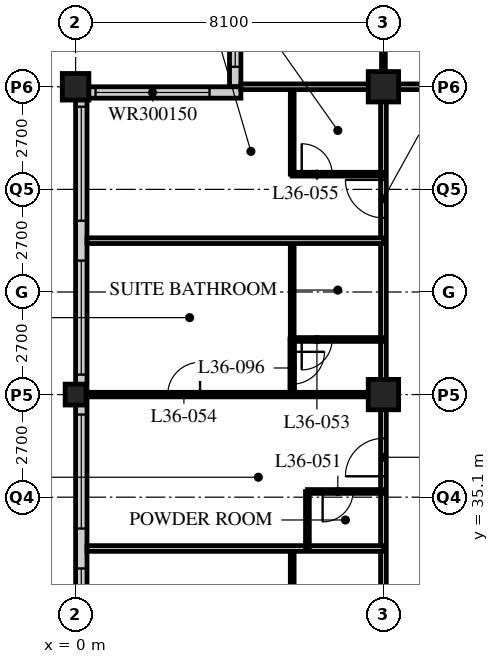
"""IFC4 building model, lengths in metres.
Left out: names, types, materials, properties, quantities, classifications, styles, units other than length and angle.
Written with IfcOpenShell. Run it as: python <this file> out.ifc"""

import sys

from ifc_helpers import new_model, si_unit, direction, frame, frame_2d, origin, origin_2d, place, context, subcontext, project, spatial, rectangle, hollow_rectangle, extrude, element, fill, save


model = new_model("IFC4")
c1 = context("Model", 3, precision=1e-05, world=origin(), true_north=direction((0.0, 1.0)))
c2 = subcontext(c1, "Body", "Model", "MODEL_VIEW")
j1 = project(units=[si_unit("LENGTHUNIT", "METRE"), si_unit("PLANEANGLEUNIT", "RADIAN")], contexts=[c1])
p1 = place(None, origin())
s1 = spatial("IfcSite", under=j1, at=p1, CompositionType="ELEMENT")
p2 = place(p1, origin())
s2 = spatial("IfcBuilding", under=s1, at=p2, CompositionType="ELEMENT")
p3 = place(p2, frame((0.0, 0.0, 140.8)))
s3 = spatial("IfcBuildingStorey", under=s2, at=p3, CompositionType="ELEMENT", Elevation=140.8)
p4 = place(p3, frame((0.0, 37.8, 0.0), z_axis=(0.0, 0.0, 1.0), x_axis=(1.0, 0.0, 0.0)))
e1 = element("IfcColumn", 1, at=p4, inside=s3, PredefinedType="COLUMN", context=c2, shape_type="SweptSolid", body=[
    extrude(hollow_rectangle(XDim=0.55, YDim=0.55, WallThickness=0.04, at=origin_2d()), origin(), (0.0, 0.0, 1.0), 3.4),
])
p5 = place(p3, frame((0.0, 45.9, 0.0), z_axis=(0.0, 0.0, 1.0), x_axis=(1.0, 0.0, 0.0)))
e2 = element("IfcColumn", 2, at=p5, inside=s3, PredefinedType="COLUMN", context=c2, shape_type="SweptSolid", body=[
    extrude(hollow_rectangle(XDim=0.7, YDim=0.7, WallThickness=0.07, at=origin_2d()), origin(), (0.0, 0.0, 1.0), 3.4),
])
for number, where, z_axis, x_axis in (
    (3, (8.1, 37.8, 0.0), (0.0, 0.0, 1.0), (1.0, 0.0, 0.0)),
    (4, (8.1, 45.9, 0.0), (0.0, 0.0, 1.0), (1.0, 0.0, 0.0)),
):
    element("IfcColumn", number, at=place(p3, frame(where, z_axis=z_axis, x_axis=x_axis)), inside=s3, PredefinedType="COLUMN", context=c2, shape_type="SweptSolid", body=[
        extrude(hollow_rectangle(XDim=0.8, YDim=0.8, WallThickness=0.08, at=origin_2d()), origin(), (0.0, 0.0, 1.0), 3.4),
    ])
p6 = place(p3, frame((4.2, 49.65, 0.0), z_axis=(0.0, 0.0, 1.0), x_axis=(0.0, -1.0, 0.0)))
e5 = element("IfcWall", 5, at=p6, inside=s3, PredefinedType="SOLIDWALL", context=c2, shape_type="SweptSolid", body=[
    extrude(rectangle(XDim=3.75, YDim=0.3, at=frame_2d((1.875, 0.0))), origin(), (0.0, 0.0, 1.0), 3.19),
])
p7 = place(p6, frame((0.225, 0.0, 0.9)))
e6 = element("IfcOpeningElement", 6, at=p7, cuts=e5, PredefinedType="OPENING", context=c2, shape_type="SweptSolid", body=[
    extrude(rectangle(XDim=3.0, YDim=1.5, at=frame_2d((1.5, 0.75))), frame((0.0, 0.16, 0.0), z_axis=(0.0, -1.0, 0.0), x_axis=(1.0, 0.0, 0.0)), (0.0, 0.0, 1.0), 0.32),
])
p8 = place(p3, frame((4.35, 45.75, 0.0), z_axis=(0.0, 0.0, 1.0), x_axis=(-1.0, 0.0, 0.0)))
e7 = element("IfcWall", 7, at=p8, inside=s3, PredefinedType="SOLIDWALL", context=c2, shape_type="SweptSolid", body=[
    extrude(rectangle(XDim=4.35, YDim=0.3, at=frame_2d((2.175, 0.0))), origin(), (0.0, 0.0, 1.0), 3.19),
])
p9 = place(p8, frame((0.825, 0.0, 0.9)))
e8 = element("IfcOpeningElement", 8, at=p9, cuts=e7, PredefinedType="OPENING", context=c2, shape_type="SweptSolid", body=[
    extrude(rectangle(XDim=3.0, YDim=1.5, at=frame_2d((1.5, 0.75))), frame((0.0, 0.16, 0.0), z_axis=(0.0, -1.0, 0.0), x_axis=(1.0, 0.0, 0.0)), (0.0, 0.0, 1.0), 0.32),
])
p10 = place(p3, frame((0.15, 45.6, 0.0), z_axis=(0.0, 0.0, 1.0), x_axis=(0.0, -1.0, 0.0)))
e9 = element("IfcWall", 9, at=p10, inside=s3, PredefinedType="SOLIDWALL", context=c2, shape_type="SweptSolid", body=[
    extrude(rectangle(XDim=32.1, YDim=0.3, at=frame_2d((16.05, 0.0))), origin(), (0.0, 0.0, 1.0), 3.19),
])
p11 = place(p10, frame((0.225, 0.0, 0.9)))
e10 = element("IfcOpeningElement", 10, at=p11, cuts=e9, PredefinedType="OPENING", context=c2, shape_type="SweptSolid", body=[
    extrude(rectangle(XDim=3.0, YDim=2.0, at=frame_2d((1.5, 1.0))), frame((0.0, 0.16, 0.0), z_axis=(0.0, -1.0, 0.0), x_axis=(1.0, 0.0, 0.0)), (0.0, 0.0, 1.0), 0.32),
])
p12 = place(p10, frame((4.275, 0.0, 0.9)))
e11 = element("IfcOpeningElement", 11, at=p12, cuts=e9, PredefinedType="OPENING", context=c2, shape_type="SweptSolid", body=[
    extrude(rectangle(XDim=3.0, YDim=2.0, at=frame_2d((1.5, 1.0))), frame((0.0, 0.16, 0.0), z_axis=(0.0, -1.0, 0.0), x_axis=(1.0, 0.0, 0.0)), (0.0, 0.0, 1.0), 0.32),
])
p13 = place(p10, frame((8.325, 0.0, 0.9)))
e12 = element("IfcOpeningElement", 12, at=p13, cuts=e9, PredefinedType="OPENING", context=c2, shape_type="SweptSolid", body=[
    extrude(rectangle(XDim=3.0, YDim=2.0, at=frame_2d((1.5, 1.0))), frame((0.0, 0.16, 0.0), z_axis=(0.0, -1.0, 0.0), x_axis=(1.0, 0.0, 0.0)), (0.0, 0.0, 1.0), 0.32),
])
p14 = place(p10, frame((12.375, 0.0, 0.9)))
e13 = element("IfcOpeningElement", 13, at=p14, cuts=e9, PredefinedType="OPENING", context=c2, shape_type="SweptSolid", body=[
    extrude(rectangle(XDim=3.0, YDim=2.0, at=frame_2d((1.5, 1.0))), frame((0.0, 0.16, 0.0), z_axis=(0.0, -1.0, 0.0), x_axis=(1.0, 0.0, 0.0)), (0.0, 0.0, 1.0), 0.32),
])
p15 = place(p10, frame((16.425, 0.0, 0.9)))
e14 = element("IfcOpeningElement", 14, at=p15, cuts=e9, PredefinedType="OPENING", context=c2, shape_type="SweptSolid", body=[
    extrude(rectangle(XDim=3.0, YDim=2.0, at=frame_2d((1.5, 1.0))), frame((0.0, 0.16, 0.0), z_axis=(0.0, -1.0, 0.0), x_axis=(1.0, 0.0, 0.0)), (0.0, 0.0, 1.0), 0.32),
])
p16 = place(p10, frame((20.475, 0.0, 0.9)))
e15 = element("IfcOpeningElement", 15, at=p16, cuts=e9, PredefinedType="OPENING", context=c2, shape_type="SweptSolid", body=[
    extrude(rectangle(XDim=3.0, YDim=2.0, at=frame_2d((1.5, 1.0))), frame((0.0, 0.16, 0.0), z_axis=(0.0, -1.0, 0.0), x_axis=(1.0, 0.0, 0.0)), (0.0, 0.0, 1.0), 0.32),
])
p17 = place(p10, frame((24.525, 0.0, 0.9)))
e16 = element("IfcOpeningElement", 16, at=p17, cuts=e9, PredefinedType="OPENING", context=c2, shape_type="SweptSolid", body=[
    extrude(rectangle(XDim=3.0, YDim=2.0, at=frame_2d((1.5, 1.0))), frame((0.0, 0.16, 0.0), z_axis=(0.0, -1.0, 0.0), x_axis=(1.0, 0.0, 0.0)), (0.0, 0.0, 1.0), 0.32),
])
p18 = place(p10, frame((28.575, 0.0, 0.9)))
e17 = element("IfcOpeningElement", 17, at=p18, cuts=e9, PredefinedType="OPENING", context=c2, shape_type="SweptSolid", body=[
    extrude(rectangle(XDim=3.0, YDim=2.0, at=frame_2d((1.5, 1.0))), frame((0.0, 0.16, 0.0), z_axis=(0.0, -1.0, 0.0), x_axis=(1.0, 0.0, 0.0)), (0.0, 0.0, 1.0), 0.32),
])
p19 = place(p3, frame((8.1, 45.9, 0.0), z_axis=(0.0, 0.0, 1.0), x_axis=(1.0, 0.0, 0.0)))
e18 = element("IfcWall", 18, at=p19, inside=s3, PredefinedType="PARTITIONING", context=c2, shape_type="SweptSolid", body=[
    extrude(rectangle(XDim=36.45, YDim=0.15, at=frame_2d((18.225, 0.0))), origin(), (0.0, 0.0, 1.0), 2.578),
])
p20 = place(p19, frame((9.625, 0.0, 0.0)))
e19 = element("IfcOpeningElement", 19, at=p20, cuts=e18, PredefinedType="OPENING", context=c2, shape_type="SweptSolid", body=[
    extrude(rectangle(XDim=1.0, YDim=2.1, at=frame_2d((0.5, 1.05))), frame((0.0, 0.085, 0.0), z_axis=(0.0, -1.0, 0.0), x_axis=(1.0, 0.0, 0.0)), (0.0, 0.0, 1.0), 0.17),
])
p21 = place(p19, frame((21.775, 0.0, 0.0)))
e20 = element("IfcOpeningElement", 20, at=p21, cuts=e18, PredefinedType="OPENING", context=c2, shape_type="SweptSolid", body=[
    extrude(rectangle(XDim=1.0, YDim=2.1, at=frame_2d((0.5, 1.05))), frame((0.0, 0.085, 0.0), z_axis=(0.0, -1.0, 0.0), x_axis=(1.0, 0.0, 0.0)), (0.0, 0.0, 1.0), 0.17),
])
p22 = place(p19, frame((28.95, 0.0, 0.0)))
e21 = element("IfcOpeningElement", 21, at=p22, cuts=e18, PredefinedType="OPENING", context=c2, shape_type="SweptSolid", body=[
    extrude(rectangle(XDim=1.0, YDim=2.1, at=frame_2d((0.5, 1.05))), frame((0.0, 0.085, 0.0), z_axis=(0.0, -1.0, 0.0), x_axis=(1.0, 0.0, 0.0)), (0.0, 0.0, 1.0), 0.17),
])
p23 = place(p19, frame((33.925, 0.0, 0.0)))
e22 = element("IfcOpeningElement", 22, at=p23, cuts=e18, PredefinedType="OPENING", context=c2, shape_type="SweptSolid", body=[
    extrude(rectangle(XDim=1.0, YDim=2.1, at=frame_2d((0.5, 1.05))), frame((0.0, 0.085, 0.0), z_axis=(0.0, -1.0, 0.0), x_axis=(1.0, 0.0, 0.0)), (0.0, 0.0, 1.0), 0.17),
])
p24 = place(p19, frame((2.625, 0.0, 0.0)))
e23 = element("IfcOpeningElement", 23, at=p24, cuts=e18, PredefinedType="OPENING", context=c2, shape_type="SweptSolid", body=[
    extrude(rectangle(XDim=1.0, YDim=2.1, at=frame_2d((0.5, 1.05))), frame((0.0, 0.085, 0.0), z_axis=(0.0, -1.0, 0.0), x_axis=(1.0, 0.0, 0.0)), (0.0, 0.0, 1.0), 0.17),
])
p25 = place(p3, frame((8.1, 17.55, 0.0), z_axis=(0.0, 0.0, 1.0), x_axis=(0.0, 1.0, 0.0)))
e24 = element("IfcWall", 24, at=p25, inside=s3, PredefinedType="PARTITIONING", context=c2, shape_type="SweptSolid", body=[
    extrude(rectangle(XDim=28.35, YDim=0.15, at=frame_2d((14.175, 0.0))), origin(), (0.0, 0.0, 1.0), 2.578),
])
p26 = place(p25, frame((1.9, 0.0, 0.0)))
e25 = element("IfcOpeningElement", 25, at=p26, cuts=e24, PredefinedType="OPENING", context=c2, shape_type="SweptSolid", body=[
    extrude(rectangle(XDim=1.0, YDim=2.1, at=frame_2d((0.5, 1.05))), frame((0.0, 0.085, 0.0), z_axis=(0.0, -1.0, 0.0), x_axis=(1.0, 0.0, 0.0)), (0.0, 0.0, 1.0), 0.17),
])
p27 = place(p25, frame((10.0, 0.0, 0.0)))
e26 = element("IfcOpeningElement", 26, at=p27, cuts=e24, PredefinedType="OPENING", context=c2, shape_type="SweptSolid", body=[
    extrude(rectangle(XDim=1.0, YDim=2.1, at=frame_2d((0.5, 1.05))), frame((0.0, 0.085, 0.0), z_axis=(0.0, -1.0, 0.0), x_axis=(1.0, 0.0, 0.0)), (0.0, 0.0, 1.0), 0.17),
])
p28 = place(p25, frame((18.1, 0.0, 0.0)))
e27 = element("IfcOpeningElement", 27, at=p28, cuts=e24, PredefinedType="OPENING", context=c2, shape_type="SweptSolid", body=[
    extrude(rectangle(XDim=1.0, YDim=2.1, at=frame_2d((0.5, 1.05))), frame((0.0, 0.085, 0.0), z_axis=(0.0, -1.0, 0.0), x_axis=(1.0, 0.0, 0.0)), (0.0, 0.0, 1.0), 0.17),
])
p29 = place(p25, frame((24.9, 0.0, 0.0)))
e28 = element("IfcOpeningElement", 28, at=p29, cuts=e24, PredefinedType="OPENING", context=c2, shape_type="SweptSolid", body=[
    extrude(rectangle(XDim=1.0, YDim=2.1, at=frame_2d((0.5, 1.05))), frame((0.0, 0.085, 0.0), z_axis=(0.0, -1.0, 0.0), x_axis=(1.0, 0.0, 0.0)), (0.0, 0.0, 1.0), 0.17),
])
p30 = place(p3, frame((5.7, 31.15, 0.0), z_axis=(0.0, 0.0, 1.0), x_axis=(0.0, 1.0, 0.0)))
e29 = element("IfcWall", 29, at=p30, inside=s3, PredefinedType="PARTITIONING", context=c2, shape_type="SweptSolid", body=[
    extrude(rectangle(XDim=2.6, YDim=0.1, at=frame_2d((1.3, 0.0))), origin(), (0.0, 0.0, 1.0), 3.19),
])
p31 = place(p3, frame((8.1, 33.75, 0.0), z_axis=(0.0, 0.0, 1.0), x_axis=(-1.0, 0.0, 0.0)))
e30 = element("IfcWall", 30, at=p31, inside=s3, PredefinedType="PARTITIONING", context=c2, shape_type="SweptSolid", body=[
    extrude(rectangle(XDim=7.8, YDim=0.15, at=frame_2d((3.9, 0.0))), origin(), (0.0, 0.0, 1.0), 3.19),
])
p32 = place(p3, frame((6.1, 33.75, 0.0), z_axis=(0.0, 0.0, 1.0), x_axis=(0.0, 1.0, 0.0)))
e31 = element("IfcWall", 31, at=p32, inside=s3, PredefinedType="PARTITIONING", context=c2, shape_type="SweptSolid", body=[
    extrude(rectangle(XDim=1.5, YDim=0.1, at=frame_2d((0.75, 0.0))), origin(), (0.0, 0.0, 1.0), 3.19),
])
p33 = place(p3, frame((8.1, 35.25, 0.0), z_axis=(0.0, 0.0, 1.0), x_axis=(-1.0, 0.0, 0.0)))
e32 = element("IfcWall", 32, at=p33, inside=s3, PredefinedType="PARTITIONING", context=c2, shape_type="SweptSolid", body=[
    extrude(rectangle(XDim=2.0, YDim=0.1, at=frame_2d((1.0, 0.0))), origin(), (0.0, 0.0, 1.0), 3.19),
])
p34 = place(p33, frame((0.8, 0.0, 0.0)))
e33 = element("IfcOpeningElement", 33, at=p34, cuts=e32, PredefinedType="OPENING", context=c2, shape_type="SweptSolid", body=[
    extrude(rectangle(XDim=0.8, YDim=2.1, at=frame_2d((0.4, 1.05))), frame((0.0, 0.06, 0.0), z_axis=(0.0, -1.0, 0.0), x_axis=(1.0, 0.0, 0.0)), (0.0, 0.0, 1.0), 0.12),
])
p35 = place(p3, frame((5.7, 39.25, 0.0), z_axis=(0.0, 0.0, 1.0), x_axis=(0.0, 1.0, 0.0)))
e34 = element("IfcWall", 34, at=p35, inside=s3, PredefinedType="PARTITIONING", context=c2, shape_type="SweptSolid", body=[
    extrude(rectangle(XDim=2.6, YDim=0.1, at=frame_2d((1.3, 0.0))), origin(), (0.0, 0.0, 1.0), 3.19),
])
p36 = place(p3, frame((8.1, 39.25, 0.0), z_axis=(0.0, 0.0, 1.0), x_axis=(-1.0, 0.0, 0.0)))
e35 = element("IfcWall", 35, at=p36, inside=s3, PredefinedType="PARTITIONING", context=c2, shape_type="SweptSolid", body=[
    extrude(rectangle(XDim=2.4, YDim=0.1, at=frame_2d((1.2, 0.0))), origin(), (0.0, 0.0, 1.0), 3.19),
])
p37 = place(p36, frame((1.35, 0.0, 0.0)))
e36 = element("IfcOpeningElement", 36, at=p37, cuts=e35, PredefinedType="OPENING", context=c2, shape_type="SweptSolid", body=[
    extrude(rectangle(XDim=0.8, YDim=2.1, at=frame_2d((0.4, 1.05))), frame((0.0, 0.06, 0.0), z_axis=(0.0, -1.0, 0.0), x_axis=(1.0, 0.0, 0.0)), (0.0, 0.0, 1.0), 0.12),
])
p38 = place(p3, frame((8.1, 37.8, 0.0), z_axis=(0.0, 0.0, 1.0), x_axis=(-1.0, 0.0, 0.0)))
e37 = element("IfcWall", 37, at=p38, inside=s3, PredefinedType="PARTITIONING", context=c2, shape_type="SweptSolid", body=[
    extrude(rectangle(XDim=7.8, YDim=0.12, at=frame_2d((3.9, 0.0))), origin(), (0.0, 0.0, 1.0), 2.578),
])
p39 = place(p38, frame((4.825, 0.0, 0.0)))
e38 = element("IfcOpeningElement", 38, at=p39, cuts=e37, PredefinedType="OPENING", context=c2, shape_type="SweptSolid", body=[
    extrude(rectangle(XDim=0.85, YDim=2.1, at=frame_2d((0.425, 1.05))), frame((0.0, 0.07, 0.0), z_axis=(0.0, -1.0, 0.0), x_axis=(1.0, 0.0, 0.0)), (0.0, 0.0, 1.0), 0.14),
])
p40 = place(p3, frame((8.1, 41.85, 0.0), z_axis=(0.0, 0.0, 1.0), x_axis=(-1.0, 0.0, 0.0)))
e39 = element("IfcWall", 39, at=p40, inside=s3, PredefinedType="PARTITIONING", context=c2, shape_type="SweptSolid", body=[
    extrude(rectangle(XDim=7.8, YDim=0.15, at=frame_2d((3.9, 0.0))), origin(), (0.0, 0.0, 1.0), 3.19),
])
p41 = place(p3, frame((5.7, 43.6, 0.0), z_axis=(0.0, 0.0, 1.0), x_axis=(0.0, 1.0, 0.0)))
e40 = element("IfcWall", 40, at=p41, inside=s3, PredefinedType="PARTITIONING", context=c2, shape_type="SweptSolid", body=[
    extrude(rectangle(XDim=2.3, YDim=0.1, at=frame_2d((1.15, 0.0))), origin(), (0.0, 0.0, 1.0), 3.19),
])
p42 = place(p3, frame((8.1, 43.6, 0.0), z_axis=(0.0, 0.0, 1.0), x_axis=(-1.0, 0.0, 0.0)))
e41 = element("IfcWall", 41, at=p42, inside=s3, PredefinedType="PARTITIONING", context=c2, shape_type="SweptSolid", body=[
    extrude(rectangle(XDim=2.4, YDim=0.1, at=frame_2d((1.2, 0.0))), origin(), (0.0, 0.0, 1.0), 3.19),
])
p43 = place(p42, frame((1.35, 0.0, 0.0)))
e42 = element("IfcOpeningElement", 42, at=p43, cuts=e41, PredefinedType="OPENING", context=c2, shape_type="SweptSolid", body=[
    extrude(rectangle(XDim=0.8, YDim=2.1, at=frame_2d((0.4, 1.05))), frame((0.0, 0.06, 0.0), z_axis=(0.0, -1.0, 0.0), x_axis=(1.0, 0.0, 0.0)), (0.0, 0.0, 1.0), 0.12),
])
p44 = place(p3, frame((8.1, 45.9, 0.0), z_axis=(0.0, 0.0, 1.0), x_axis=(0.0, 1.0, 0.0)))
e43 = element("IfcWall", 43, at=p44, inside=s3, PredefinedType="PARTITIONING", context=c2, shape_type="SweptSolid", body=[
    extrude(rectangle(XDim=2.4, YDim=0.1, at=frame_2d((1.2, 0.0))), origin(), (0.0, 0.0, 1.0), 2.578),
])
p45 = place(p3, frame((4.35, 45.9, 0.0), z_axis=(0.0, 0.0, 1.0), x_axis=(1.0, 0.0, 0.0)))
e44 = element("IfcWall", 44, at=p45, inside=s3, PredefinedType="PARTITIONING", context=c2, shape_type="SweptSolid", body=[
    extrude(rectangle(XDim=3.75, YDim=0.15, at=frame_2d((1.875, 0.0))), origin(), (0.0, 0.0, 1.0), 2.578),
])
p46 = place(p3, frame((5.7, 37.8, 0.0), z_axis=(0.0, 0.0, 1.0), x_axis=(0.0, 1.0, 0.0)))
e45 = element("IfcWall", 45, at=p46, inside=s3, PredefinedType="PARTITIONING", context=c2, shape_type="SweptSolid", body=[
    extrude(rectangle(XDim=1.46, YDim=0.12, at=frame_2d((0.73, 0.0))), origin(), (0.0, 0.0, 1.0), 3.19),
])
p47 = place(p46, frame((0.275, 0.0, 0.0)))
e46 = element("IfcOpeningElement", 46, at=p47, cuts=e45, PredefinedType="OPENING", context=c2, shape_type="SweptSolid", body=[
    extrude(rectangle(XDim=0.85, YDim=2.1, at=frame_2d((0.425, 1.05))), frame((0.0, 0.07, 0.0), z_axis=(0.0, -1.0, 0.0), x_axis=(1.0, 0.0, 0.0)), (0.0, 0.0, 1.0), 0.14),
])
p48 = place(p7, origin())
e47 = element("IfcWindow", 47, at=p48, inside=s3, PartitioningType="SINGLE_PANEL", PredefinedType="WINDOW", context=c2, shape_type="SweptSolid", body=[
    extrude(rectangle(XDim=3.0, YDim=1.5, at=frame_2d((1.5, 0.75))), frame((0.0, 0.03, 0.0), z_axis=(0.0, -1.0, 0.0), x_axis=(1.0, 0.0, 0.0)), (0.0, 0.0, 1.0), 0.06),
])
fill(e6, e47)
p49 = place(p9, origin())
e48 = element("IfcWindow", 48, at=p49, inside=s3, PartitioningType="SINGLE_PANEL", PredefinedType="WINDOW", context=c2, shape_type="SweptSolid", body=[
    extrude(rectangle(XDim=3.0, YDim=1.5, at=frame_2d((1.5, 0.75))), frame((0.0, 0.03, 0.0), z_axis=(0.0, -1.0, 0.0), x_axis=(1.0, 0.0, 0.0)), (0.0, 0.0, 1.0), 0.06),
])
fill(e8, e48)
p50 = place(p11, origin())
e49 = element("IfcWindow", 49, at=p50, inside=s3, PartitioningType="SINGLE_PANEL", PredefinedType="WINDOW", context=c2, shape_type="SweptSolid", body=[
    extrude(rectangle(XDim=3.0, YDim=2.0, at=frame_2d((1.5, 1.0))), frame((0.0, 0.03, 0.0), z_axis=(0.0, -1.0, 0.0), x_axis=(1.0, 0.0, 0.0)), (0.0, 0.0, 1.0), 0.06),
])
fill(e10, e49)
p51 = place(p12, origin())
e50 = element("IfcWindow", 50, at=p51, inside=s3, PartitioningType="SINGLE_PANEL", PredefinedType="WINDOW", context=c2, shape_type="SweptSolid", body=[
    extrude(rectangle(XDim=3.0, YDim=2.0, at=frame_2d((1.5, 1.0))), frame((0.0, 0.03, 0.0), z_axis=(0.0, -1.0, 0.0), x_axis=(1.0, 0.0, 0.0)), (0.0, 0.0, 1.0), 0.06),
])
fill(e11, e50)
p52 = place(p13, origin())
e51 = element("IfcWindow", 51, at=p52, inside=s3, PartitioningType="SINGLE_PANEL", PredefinedType="WINDOW", context=c2, shape_type="SweptSolid", body=[
    extrude(rectangle(XDim=3.0, YDim=2.0, at=frame_2d((1.5, 1.0))), frame((0.0, 0.03, 0.0), z_axis=(0.0, -1.0, 0.0), x_axis=(1.0, 0.0, 0.0)), (0.0, 0.0, 1.0), 0.06),
])
fill(e12, e51)
p53 = place(p14, origin())
e52 = element("IfcWindow", 52, at=p53, inside=s3, PartitioningType="SINGLE_PANEL", PredefinedType="WINDOW", context=c2, shape_type="SweptSolid", body=[
    extrude(rectangle(XDim=3.0, YDim=2.0, at=frame_2d((1.5, 1.0))), frame((0.0, 0.03, 0.0), z_axis=(0.0, -1.0, 0.0), x_axis=(1.0, 0.0, 0.0)), (0.0, 0.0, 1.0), 0.06),
])
fill(e13, e52)
p54 = place(p34, origin())
e53 = element("IfcDoor", 53, at=p54, inside=s3, OperationType="SINGLE_SWING_RIGHT", PredefinedType="DOOR", context=c2, shape_type="SweptSolid", body=[
    extrude(rectangle(XDim=0.8, YDim=2.1, at=frame_2d((0.4, 1.05))), frame((0.0, 0.025, 0.0), z_axis=(0.0, -1.0, 0.0), x_axis=(1.0, 0.0, 0.0)), (0.0, 0.0, 1.0), 0.05),
])
fill(e33, e53)
p55 = place(p28, origin())
e54 = element("IfcDoor", 54, at=p55, inside=s3, OperationType="SINGLE_SWING_LEFT", PredefinedType="DOOR", context=c2, shape_type="SweptSolid", body=[
    extrude(rectangle(XDim=1.0, YDim=2.1, at=frame_2d((0.5, 1.05))), frame((0.0, 0.025, 0.0), z_axis=(0.0, -1.0, 0.0), x_axis=(1.0, 0.0, 0.0)), (0.0, 0.0, 1.0), 0.05),
])
fill(e27, e54)
p56 = place(p37, origin())
e55 = element("IfcDoor", 55, at=p56, inside=s3, OperationType="SINGLE_SWING_RIGHT", PredefinedType="DOOR", context=c2, shape_type="SweptSolid", body=[
    extrude(rectangle(XDim=0.8, YDim=2.1, at=frame_2d((0.4, 1.05))), frame((0.0, 0.025, 0.0), z_axis=(0.0, -1.0, 0.0), x_axis=(1.0, 0.0, 0.0)), (0.0, 0.0, 1.0), 0.05),
])
fill(e36, e55)
p57 = place(p39, origin())
e56 = element("IfcDoor", 56, at=p57, inside=s3, OperationType="SINGLE_SWING_RIGHT", PredefinedType="DOOR", context=c2, shape_type="SweptSolid", body=[
    extrude(rectangle(XDim=0.85, YDim=2.1, at=frame_2d((0.425, 1.05))), frame((0.0, 0.025, 0.0), z_axis=(0.0, -1.0, 0.0), x_axis=(1.0, 0.0, 0.0)), (0.0, 0.0, 1.0), 0.05),
])
fill(e38, e56)
p58 = place(p43, origin())
e57 = element("IfcDoor", 57, at=p58, inside=s3, OperationType="SINGLE_SWING_LEFT", PredefinedType="DOOR", context=c2, shape_type="SweptSolid", body=[
    extrude(rectangle(XDim=0.8, YDim=2.1, at=frame_2d((0.4, 1.05))), frame((0.0, 0.025, 0.0), z_axis=(0.0, -1.0, 0.0), x_axis=(1.0, 0.0, 0.0)), (0.0, 0.0, 1.0), 0.05),
])
fill(e42, e57)
p59 = place(p29, origin())
e58 = element("IfcDoor", 58, at=p59, inside=s3, OperationType="SINGLE_SWING_RIGHT", PredefinedType="DOOR", context=c2, shape_type="SweptSolid", body=[
    extrude(rectangle(XDim=1.0, YDim=2.1, at=frame_2d((0.5, 1.05))), frame((0.0, 0.025, 0.0), z_axis=(0.0, -1.0, 0.0), x_axis=(1.0, 0.0, 0.0)), (0.0, 0.0, 1.0), 0.05),
])
fill(e28, e58)
p60 = place(p47, origin())
e59 = element("IfcDoor", 59, at=p60, inside=s3, OperationType="SINGLE_SWING_LEFT", PredefinedType="DOOR", context=c2, shape_type="SweptSolid", body=[
    extrude(rectangle(XDim=0.85, YDim=2.1, at=frame_2d((0.425, 1.05))), frame((0.0, 0.025, 0.0), z_axis=(0.0, -1.0, 0.0), x_axis=(1.0, 0.0, 0.0)), (0.0, 0.0, 1.0), 0.05),
])
fill(e46, e59)
save(model, sys.argv[1])
